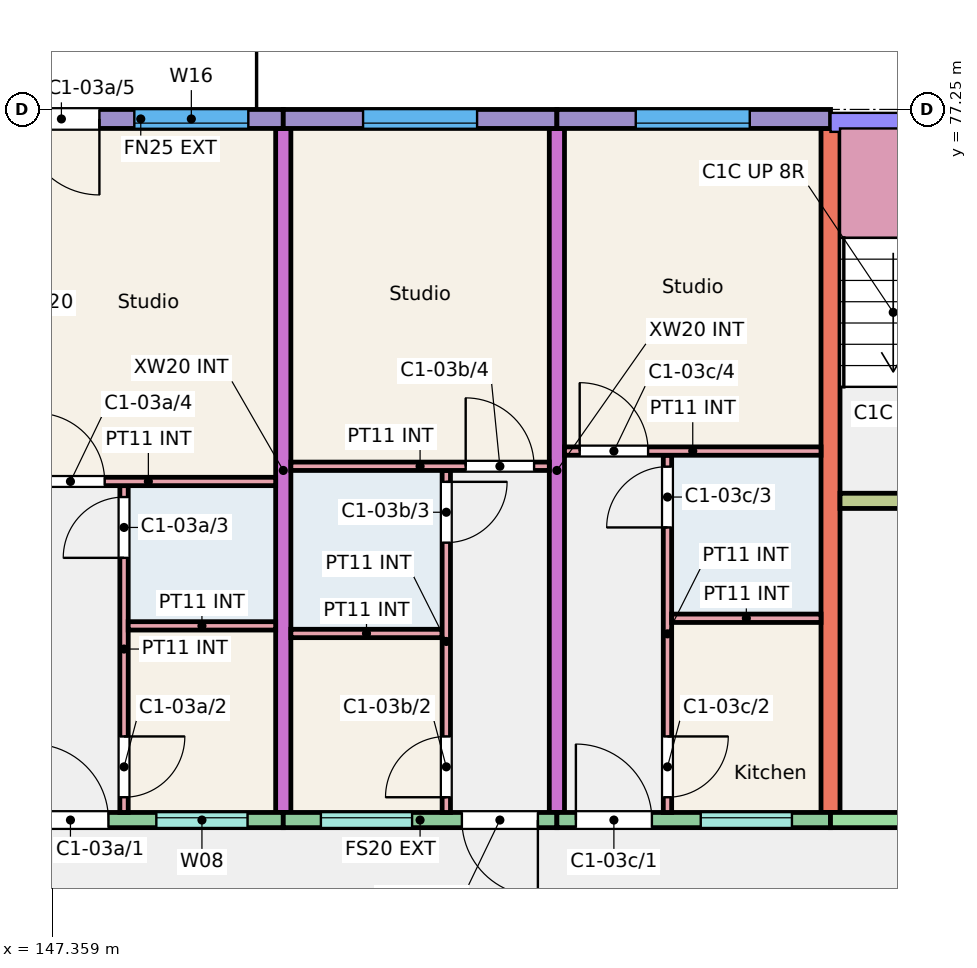
"""IFC4 building model, lengths in metres.
Left out: names, types, materials, properties, quantities, classifications, styles, units other than length and angle.
Written with IfcOpenShell. Run it as: python <this file> out.ifc"""

import sys

from ifc_helpers import new_model, si_unit, direction, frame, frame_2d, origin, place, context, subcontext, project, spatial, rectangle, extrude, element, fill, save


model = new_model("IFC4")
c1 = context("Model", 3, precision=1e-05, world=origin(), true_north=direction((0.0, 1.0)))
c2 = subcontext(c1, "Body", "Model", "MODEL_VIEW")
j1 = project(units=[si_unit("LENGTHUNIT", "METRE"), si_unit("PLANEANGLEUNIT", "RADIAN")], contexts=[c1])
p1 = place(None, origin())
s1 = spatial("IfcSite", under=j1, at=p1, CompositionType="ELEMENT")
p2 = place(p1, origin())
s2 = spatial("IfcBuilding", under=s1, at=p2, CompositionType="ELEMENT")
p3 = place(p2, frame((0.0, 0.0, 9.0)))
s3 = spatial("IfcBuildingStorey", under=s2, at=p3, CompositionType="ELEMENT", Elevation=9.0)
for number, where, z_axis, x_axis in (
    (1, (150.4, 68.0, 0.0), (0.0, 0.0, 1.0), (0.0, 1.0, 0.0)),
    (2, (154.0, 68.0, 0.0), (0.0, 0.0, 1.0), (0.0, 1.0, 0.0)),
):
    element("IfcWall", number, at=place(p3, frame(where, z_axis=z_axis, x_axis=x_axis)), inside=s3, PredefinedType="SHEAR", context=c2, shape_type="SweptSolid", body=[
        extrude(rectangle(XDim=9.0, YDim=0.2, at=frame_2d((4.5, 0.0))), origin(), (0.0, 0.0, 1.0), 3.0),
    ])
p4 = place(p3, frame((157.6, 68.0, 0.0), z_axis=(0.0, 0.0, 1.0), x_axis=(0.0, 1.0, 0.0)))
e3 = element("IfcWall", 3, at=p4, inside=s3, PredefinedType="SHEAR", context=c2, shape_type="SweptSolid", body=[
    extrude(rectangle(XDim=9.0, YDim=0.25, at=frame_2d((4.5, 0.0))), origin(), (0.0, 0.0, 1.0), 3.0),
])
p5 = place(p3, frame((146.65, 77.125, 0.0), z_axis=(0.0, 0.0, 1.0), x_axis=(1.0, 0.0, 0.0)))
e4 = element("IfcWall", 4, at=p5, inside=s3, PredefinedType="SOLIDWALL", context=c2, shape_type="SweptSolid", body=[
    extrude(rectangle(XDim=3.75, YDim=0.25, at=frame_2d((1.875, 0.0))), origin(), (0.0, 0.0, 1.0), 3.0),
])
p6 = place(p5, frame((1.791, 0.0, 0.9)))
e5 = element("IfcOpeningElement", 5, at=p6, cuts=e4, PredefinedType="OPENING", context=c2, shape_type="SweptSolid", body=[
    extrude(rectangle(XDim=1.5, YDim=1.5, at=frame_2d((0.75, 0.75))), frame((0.0, 0.135, 0.0), z_axis=(0.0, -1.0, 0.0), x_axis=(1.0, 0.0, 0.0)), (0.0, 0.0, 1.0), 0.27),
])
p7 = place(p5, frame((0.331, 0.0, 0.0)))
e6 = element("IfcOpeningElement", 6, at=p7, cuts=e4, PredefinedType="OPENING", context=c2, shape_type="SweptSolid", body=[
    extrude(rectangle(XDim=1.0, YDim=2.1, at=frame_2d((0.5, 1.05))), frame((0.0, 0.135, 0.0), z_axis=(0.0, -1.0, 0.0), x_axis=(1.0, 0.0, 0.0)), (0.0, 0.0, 1.0), 0.27),
])
p8 = place(p3, frame((146.95, 67.9, 0.0), z_axis=(0.0, 0.0, 1.0), x_axis=(1.0, 0.0, 0.0)))
e7 = element("IfcWall", 7, at=p8, inside=s3, PredefinedType="SOLIDWALL", context=c2, shape_type="SweptSolid", body=[
    extrude(rectangle(XDim=3.45, YDim=0.2, at=frame_2d((1.725, 0.0))), origin(), (0.0, 0.0, 1.0), 3.0),
])
p9 = place(p8, frame((1.78, 0.0, 1.1)))
e8 = element("IfcOpeningElement", 8, at=p9, cuts=e7, PredefinedType="OPENING", context=c2, shape_type="SweptSolid", body=[
    extrude(rectangle(XDim=1.2, YDim=1.3, at=frame_2d((0.6, 0.65))), frame((0.0, 0.11, 0.0), z_axis=(0.0, -1.0, 0.0), x_axis=(1.0, 0.0, 0.0)), (0.0, 0.0, 1.0), 0.22),
])
p10 = place(p8, frame((0.15, 0.0, 0.0)))
e9 = element("IfcOpeningElement", 9, at=p10, cuts=e7, PredefinedType="OPENING", context=c2, shape_type="SweptSolid", body=[
    extrude(rectangle(XDim=1.0, YDim=2.1, at=frame_2d((0.5, 1.05))), frame((0.0, 0.11, 0.0), z_axis=(0.0, -1.0, 0.0), x_axis=(1.0, 0.0, 0.0)), (0.0, 0.0, 1.0), 0.22),
])
p11 = place(p3, frame((150.4, 77.125, 0.0), z_axis=(0.0, 0.0, 1.0), x_axis=(1.0, 0.0, 0.0)))
e10 = element("IfcWall", 10, at=p11, inside=s3, PredefinedType="SOLIDWALL", context=c2, shape_type="SweptSolid", body=[
    extrude(rectangle(XDim=3.6, YDim=0.25, at=frame_2d((1.8, 0.0))), origin(), (0.0, 0.0, 1.0), 3.0),
])
p12 = place(p11, frame((1.05, 0.0, 0.9)))
e11 = element("IfcOpeningElement", 11, at=p12, cuts=e10, PredefinedType="OPENING", context=c2, shape_type="SweptSolid", body=[
    extrude(rectangle(XDim=1.5, YDim=1.5, at=frame_2d((0.75, 0.75))), frame((0.0, 0.135, 0.0), z_axis=(0.0, -1.0, 0.0), x_axis=(1.0, 0.0, 0.0)), (0.0, 0.0, 1.0), 0.27),
])
p13 = place(p3, frame((150.4, 67.9, 0.0), z_axis=(0.0, 0.0, 1.0), x_axis=(1.0, 0.0, 0.0)))
e12 = element("IfcWall", 12, at=p13, inside=s3, PredefinedType="SOLIDWALL", context=c2, shape_type="SweptSolid", body=[
    extrude(rectangle(XDim=3.6, YDim=0.2, at=frame_2d((1.8, 0.0))), origin(), (0.0, 0.0, 1.0), 3.0),
])
p14 = place(p13, frame((0.495, 0.0, 1.1)))
e13 = element("IfcOpeningElement", 13, at=p14, cuts=e12, PredefinedType="OPENING", context=c2, shape_type="SweptSolid", body=[
    extrude(rectangle(XDim=1.2, YDim=1.3, at=frame_2d((0.6, 0.65))), frame((0.0, 0.11, 0.0), z_axis=(0.0, -1.0, 0.0), x_axis=(1.0, 0.0, 0.0)), (0.0, 0.0, 1.0), 0.22),
])
p15 = place(p13, frame((2.35, 0.0, 0.0)))
e14 = element("IfcOpeningElement", 14, at=p15, cuts=e12, PredefinedType="OPENING", context=c2, shape_type="SweptSolid", body=[
    extrude(rectangle(XDim=1.0, YDim=2.1, at=frame_2d((0.5, 1.05))), frame((0.0, 0.11, 0.0), z_axis=(0.0, -1.0, 0.0), x_axis=(1.0, 0.0, 0.0)), (0.0, 0.0, 1.0), 0.22),
])
p16 = place(p3, frame((154.0, 77.125, 0.0), z_axis=(0.0, 0.0, 1.0), x_axis=(1.0, 0.0, 0.0)))
e15 = element("IfcWall", 15, at=p16, inside=s3, PredefinedType="SOLIDWALL", context=c2, shape_type="SweptSolid", body=[
    extrude(rectangle(XDim=3.6, YDim=0.25, at=frame_2d((1.8, 0.0))), origin(), (0.0, 0.0, 1.0), 3.0),
])
p17 = place(p16, frame((1.038, 0.0, 0.9)))
e16 = element("IfcOpeningElement", 16, at=p17, cuts=e15, PredefinedType="OPENING", context=c2, shape_type="SweptSolid", body=[
    extrude(rectangle(XDim=1.5, YDim=1.5, at=frame_2d((0.75, 0.75))), frame((0.0, 0.135, 0.0), z_axis=(0.0, -1.0, 0.0), x_axis=(1.0, 0.0, 0.0)), (0.0, 0.0, 1.0), 0.27),
])
p18 = place(p3, frame((154.0, 67.9, 0.0), z_axis=(0.0, 0.0, 1.0), x_axis=(1.0, 0.0, 0.0)))
e17 = element("IfcWall", 17, at=p18, inside=s3, PredefinedType="SOLIDWALL", context=c2, shape_type="SweptSolid", body=[
    extrude(rectangle(XDim=3.6, YDim=0.2, at=frame_2d((1.8, 0.0))), origin(), (0.0, 0.0, 1.0), 3.0),
])
p19 = place(p18, frame((1.893, 0.0, 1.1)))
e18 = element("IfcOpeningElement", 18, at=p19, cuts=e17, PredefinedType="OPENING", context=c2, shape_type="SweptSolid", body=[
    extrude(rectangle(XDim=1.2, YDim=1.3, at=frame_2d((0.6, 0.65))), frame((0.0, 0.11, 0.0), z_axis=(0.0, -1.0, 0.0), x_axis=(1.0, 0.0, 0.0)), (0.0, 0.0, 1.0), 0.22),
])
p20 = place(p18, frame((0.25, 0.0, 0.0)))
e19 = element("IfcOpeningElement", 19, at=p20, cuts=e17, PredefinedType="OPENING", context=c2, shape_type="SweptSolid", body=[
    extrude(rectangle(XDim=1.0, YDim=2.1, at=frame_2d((0.5, 1.05))), frame((0.0, 0.11, 0.0), z_axis=(0.0, -1.0, 0.0), x_axis=(1.0, 0.0, 0.0)), (0.0, 0.0, 1.0), 0.22),
])
p21 = place(p3, frame((157.6, 67.9, 0.0), z_axis=(0.0, 0.0, 1.0), x_axis=(1.0, 0.0, 0.0)))
e20 = element("IfcWall", 20, at=p21, inside=s3, PredefinedType="SHEAR", context=c2, shape_type="SweptSolid", body=[
    extrude(rectangle(XDim=5.85, YDim=0.2, at=frame_2d((2.925, 0.0))), origin(), (0.0, 0.0, 1.0), 3.0),
])
p22 = place(p21, frame((2.438, 0.0, 0.0)))
e21 = element("IfcOpeningElement", 21, at=p22, cuts=e20, PredefinedType="OPENING", context=c2, shape_type="SweptSolid", body=[
    extrude(rectangle(XDim=1.1, YDim=2.1, at=frame_2d((0.55, 1.05))), frame((0.0, 0.11, 0.0), z_axis=(0.0, -1.0, 0.0), x_axis=(1.0, 0.0, 0.0)), (0.0, 0.0, 1.0), 0.22),
])
p23 = place(p3, frame((157.725, 72.1, 0.0), z_axis=(0.0, 0.0, 1.0), x_axis=(1.0, 0.0, 0.0)))
e22 = element("IfcWall", 22, at=p23, inside=s3, PredefinedType="SHEAR", context=c2, shape_type="SweptSolid", body=[
    extrude(rectangle(XDim=5.725, YDim=0.2, at=frame_2d((2.862, 0.0))), origin(), (0.0, 0.0, 1.0), 3.0),
])
p24 = place(p23, frame((0.95, 0.0, 0.0)))
e23 = element("IfcOpeningElement", 23, at=p24, cuts=e22, PredefinedType="OPENING", context=c2, shape_type="SweptSolid", body=[
    extrude(rectangle(XDim=1.0, YDim=2.1, at=frame_2d((0.5, 1.05))), frame((0.0, 0.11, 0.0), z_axis=(0.0, -1.0, 0.0), x_axis=(1.0, 0.0, 0.0)), (0.0, 0.0, 1.0), 0.22),
])
p25 = place(p23, frame((3.863, 0.0, 0.0)))
e24 = element("IfcOpeningElement", 24, at=p25, cuts=e22, PredefinedType="OPENING", context=c2, shape_type="SweptSolid", body=[
    extrude(rectangle(XDim=1.1, YDim=2.1, at=frame_2d((0.55, 1.05))), frame((0.0, 0.11, 0.0), z_axis=(0.0, -1.0, 0.0), x_axis=(1.0, 0.0, 0.0)), (0.0, 0.0, 1.0), 0.22),
])
p26 = place(p3, frame((148.305, 68.0, 0.0), z_axis=(0.0, 0.0, 1.0), x_axis=(0.0, 1.0, 0.0)))
e25 = element("IfcWall", 25, at=p26, inside=s3, PredefinedType="PARTITIONING", context=c2, shape_type="SweptSolid", body=[
    extrude(rectangle(XDim=4.3, YDim=0.11, at=frame_2d((2.15, 0.0))), origin(), (0.0, 0.0, 1.0), 2.8),
])
p27 = place(p26, frame((0.2, 0.0, 0.0)))
e26 = element("IfcOpeningElement", 26, at=p27, cuts=e25, PredefinedType="OPENING", context=c2, shape_type="SweptSolid", body=[
    extrude(rectangle(XDim=0.8, YDim=2.1, at=frame_2d((0.4, 1.05))), frame((0.0, 0.065, 0.0), z_axis=(0.0, -1.0, 0.0), x_axis=(1.0, 0.0, 0.0)), (0.0, 0.0, 1.0), 0.13),
])
p28 = place(p26, frame((3.35, 0.0, 0.0)))
e27 = element("IfcOpeningElement", 27, at=p28, cuts=e25, PredefinedType="OPENING", context=c2, shape_type="SweptSolid", body=[
    extrude(rectangle(XDim=0.8, YDim=2.1, at=frame_2d((0.4, 1.05))), frame((0.0, 0.065, 0.0), z_axis=(0.0, -1.0, 0.0), x_axis=(1.0, 0.0, 0.0)), (0.0, 0.0, 1.0), 0.13),
])
p29 = place(p3, frame((148.36, 70.455, 0.0), z_axis=(0.0, 0.0, 1.0), x_axis=(1.0, 0.0, 0.0)))
e28 = element("IfcWall", 28, at=p29, inside=s3, PredefinedType="PARTITIONING", context=c2, shape_type="SweptSolid", body=[
    extrude(rectangle(XDim=1.94, YDim=0.11, at=frame_2d((0.97, 0.0))), origin(), (0.0, 0.0, 1.0), 2.8),
])
p30 = place(p3, frame((146.95, 72.355, 0.0), z_axis=(0.0, 0.0, 1.0), x_axis=(1.0, 0.0, 0.0)))
e29 = element("IfcWall", 29, at=p30, inside=s3, PredefinedType="PARTITIONING", context=c2, shape_type="SweptSolid", body=[
    extrude(rectangle(XDim=3.35, YDim=0.11, at=frame_2d((1.675, 0.0))), origin(), (0.0, 0.0, 1.0), 2.8),
])
p31 = place(p30, frame((0.2, 0.0, 0.0)))
e30 = element("IfcOpeningElement", 30, at=p31, cuts=e29, PredefinedType="OPENING", context=c2, shape_type="SweptSolid", body=[
    extrude(rectangle(XDim=0.9, YDim=2.1, at=frame_2d((0.45, 1.05))), frame((0.0, 0.065, 0.0), z_axis=(0.0, -1.0, 0.0), x_axis=(1.0, 0.0, 0.0)), (0.0, 0.0, 1.0), 0.13),
])
p32 = place(p3, frame((150.5, 70.355, 0.0), z_axis=(0.0, 0.0, 1.0), x_axis=(1.0, 0.0, 0.0)))
e31 = element("IfcWall", 31, at=p32, inside=s3, PredefinedType="PARTITIONING", context=c2, shape_type="SweptSolid", body=[
    extrude(rectangle(XDim=1.99, YDim=0.11, at=frame_2d((0.995, 0.0))), origin(), (0.0, 0.0, 1.0), 2.8),
])
p33 = place(p3, frame((152.545, 68.0, 0.0), z_axis=(0.0, 0.0, 1.0), x_axis=(0.0, 1.0, 0.0)))
e32 = element("IfcWall", 32, at=p33, inside=s3, PredefinedType="PARTITIONING", context=c2, shape_type="SweptSolid", body=[
    extrude(rectangle(XDim=4.5, YDim=0.11, at=frame_2d((2.25, 0.0))), origin(), (0.0, 0.0, 1.0), 2.8),
])
p34 = place(p33, frame((0.2, 0.0, 0.0)))
e33 = element("IfcOpeningElement", 33, at=p34, cuts=e32, PredefinedType="OPENING", context=c2, shape_type="SweptSolid", body=[
    extrude(rectangle(XDim=0.8, YDim=2.1, at=frame_2d((0.4, 1.05))), frame((0.0, 0.065, 0.0), z_axis=(0.0, -1.0, 0.0), x_axis=(1.0, 0.0, 0.0)), (0.0, 0.0, 1.0), 0.13),
])
p35 = place(p33, frame((3.55, 0.0, 0.0)))
e34 = element("IfcOpeningElement", 34, at=p35, cuts=e32, PredefinedType="OPENING", context=c2, shape_type="SweptSolid", body=[
    extrude(rectangle(XDim=0.8, YDim=2.1, at=frame_2d((0.4, 1.05))), frame((0.0, 0.065, 0.0), z_axis=(0.0, -1.0, 0.0), x_axis=(1.0, 0.0, 0.0)), (0.0, 0.0, 1.0), 0.13),
])
p36 = place(p3, frame((150.5, 72.555, 0.0), z_axis=(0.0, 0.0, 1.0), x_axis=(1.0, 0.0, 0.0)))
e35 = element("IfcWall", 35, at=p36, inside=s3, PredefinedType="PARTITIONING", context=c2, shape_type="SweptSolid", body=[
    extrude(rectangle(XDim=3.4, YDim=0.11, at=frame_2d((1.7, 0.0))), origin(), (0.0, 0.0, 1.0), 2.8),
])
p37 = place(p36, frame((2.3, 0.0, 0.0)))
e36 = element("IfcOpeningElement", 36, at=p37, cuts=e35, PredefinedType="OPENING", context=c2, shape_type="SweptSolid", body=[
    extrude(rectangle(XDim=0.9, YDim=2.1, at=frame_2d((0.45, 1.05))), frame((0.0, 0.065, 0.0), z_axis=(0.0, -1.0, 0.0), x_axis=(1.0, 0.0, 0.0)), (0.0, 0.0, 1.0), 0.13),
])
p38 = place(p3, frame((155.455, 68.0, 0.0), z_axis=(0.0, 0.0, 1.0), x_axis=(0.0, 1.0, 0.0)))
e37 = element("IfcWall", 37, at=p38, inside=s3, PredefinedType="PARTITIONING", context=c2, shape_type="SweptSolid", body=[
    extrude(rectangle(XDim=4.7, YDim=0.11, at=frame_2d((2.35, 0.0))), origin(), (0.0, 0.0, 1.0), 2.8),
])
p39 = place(p38, frame((0.2, 0.0, 0.0)))
e38 = element("IfcOpeningElement", 38, at=p39, cuts=e37, PredefinedType="OPENING", context=c2, shape_type="SweptSolid", body=[
    extrude(rectangle(XDim=0.8, YDim=2.1, at=frame_2d((0.4, 1.05))), frame((0.0, 0.065, 0.0), z_axis=(0.0, -1.0, 0.0), x_axis=(1.0, 0.0, 0.0)), (0.0, 0.0, 1.0), 0.13),
])
p40 = place(p38, frame((3.75, 0.0, 0.0)))
e39 = element("IfcOpeningElement", 39, at=p40, cuts=e37, PredefinedType="OPENING", context=c2, shape_type="SweptSolid", body=[
    extrude(rectangle(XDim=0.8, YDim=2.1, at=frame_2d((0.4, 1.05))), frame((0.0, 0.065, 0.0), z_axis=(0.0, -1.0, 0.0), x_axis=(1.0, 0.0, 0.0)), (0.0, 0.0, 1.0), 0.13),
])
p41 = place(p3, frame((155.51, 70.555, 0.0), z_axis=(0.0, 0.0, 1.0), x_axis=(1.0, 0.0, 0.0)))
e40 = element("IfcWall", 40, at=p41, inside=s3, PredefinedType="PARTITIONING", context=c2, shape_type="SweptSolid", body=[
    extrude(rectangle(XDim=1.965, YDim=0.11, at=frame_2d((0.982, 0.0))), origin(), (0.0, 0.0, 1.0), 2.8),
])
p42 = place(p3, frame((154.1, 72.755, 0.0), z_axis=(0.0, 0.0, 1.0), x_axis=(1.0, 0.0, 0.0)))
e41 = element("IfcWall", 41, at=p42, inside=s3, PredefinedType="PARTITIONING", context=c2, shape_type="SweptSolid", body=[
    extrude(rectangle(XDim=3.375, YDim=0.11, at=frame_2d((1.688, 0.0))), origin(), (0.0, 0.0, 1.0), 2.8),
])
p43 = place(p42, frame((0.2, 0.0, 0.0)))
e42 = element("IfcOpeningElement", 42, at=p43, cuts=e41, PredefinedType="OPENING", context=c2, shape_type="SweptSolid", body=[
    extrude(rectangle(XDim=0.9, YDim=2.1, at=frame_2d((0.45, 1.05))), frame((0.0, 0.065, 0.0), z_axis=(0.0, -1.0, 0.0), x_axis=(1.0, 0.0, 0.0)), (0.0, 0.0, 1.0), 0.13),
])
p44 = place(p9, origin())
e43 = element("IfcWindow", 43, at=p44, inside=s3, PartitioningType="SINGLE_PANEL", PredefinedType="WINDOW", context=c2, shape_type="SweptSolid", body=[
    extrude(rectangle(XDim=1.2, YDim=1.3, at=frame_2d((0.6, 0.65))), frame((0.0, 0.06, 0.0), z_axis=(0.0, -1.0, 0.0), x_axis=(1.0, 0.0, 0.0)), (0.0, 0.0, 1.0), 0.06),
])
fill(e8, e43)
p45 = place(p6, origin())
e44 = element("IfcWindow", 44, at=p45, inside=s3, PartitioningType="SINGLE_PANEL", PredefinedType="WINDOW", context=c2, shape_type="SweptSolid", body=[
    extrude(rectangle(XDim=1.5, YDim=1.5, at=frame_2d((0.75, 0.75))), frame((0.0, -0.025, 0.0), z_axis=(0.0, -1.0, 0.0), x_axis=(1.0, 0.0, 0.0)), (0.0, 0.0, 1.0), 0.06),
])
fill(e5, e44)
p46 = place(p14, origin())
e45 = element("IfcWindow", 45, at=p46, inside=s3, PartitioningType="SINGLE_PANEL", PredefinedType="WINDOW", context=c2, shape_type="SweptSolid", body=[
    extrude(rectangle(XDim=1.2, YDim=1.3, at=frame_2d((0.6, 0.65))), frame((0.0, 0.06, 0.0), z_axis=(0.0, -1.0, 0.0), x_axis=(1.0, 0.0, 0.0)), (0.0, 0.0, 1.0), 0.06),
])
fill(e13, e45)
p47 = place(p12, origin())
e46 = element("IfcWindow", 46, at=p47, inside=s3, PartitioningType="SINGLE_PANEL", PredefinedType="WINDOW", context=c2, shape_type="SweptSolid", body=[
    extrude(rectangle(XDim=1.5, YDim=1.5, at=frame_2d((0.75, 0.75))), frame((0.0, -0.025, 0.0), z_axis=(0.0, -1.0, 0.0), x_axis=(1.0, 0.0, 0.0)), (0.0, 0.0, 1.0), 0.06),
])
fill(e11, e46)
p48 = place(p19, origin())
e47 = element("IfcWindow", 47, at=p48, inside=s3, PartitioningType="SINGLE_PANEL", PredefinedType="WINDOW", context=c2, shape_type="SweptSolid", body=[
    extrude(rectangle(XDim=1.2, YDim=1.3, at=frame_2d((0.6, 0.65))), frame((0.0, 0.06, 0.0), z_axis=(0.0, -1.0, 0.0), x_axis=(1.0, 0.0, 0.0)), (0.0, 0.0, 1.0), 0.06),
])
fill(e18, e47)
p49 = place(p17, origin())
e48 = element("IfcWindow", 48, at=p49, inside=s3, PartitioningType="SINGLE_PANEL", PredefinedType="WINDOW", context=c2, shape_type="SweptSolid", body=[
    extrude(rectangle(XDim=1.5, YDim=1.5, at=frame_2d((0.75, 0.75))), frame((0.0, -0.025, 0.0), z_axis=(0.0, -1.0, 0.0), x_axis=(1.0, 0.0, 0.0)), (0.0, 0.0, 1.0), 0.06),
])
fill(e16, e48)
p50 = place(p10, origin())
e49 = element("IfcDoor", 49, at=p50, inside=s3, OperationType="SINGLE_SWING_LEFT", PredefinedType="DOOR", context=c2, shape_type="SweptSolid", body=[
    extrude(rectangle(XDim=1.0, YDim=2.1, at=frame_2d((0.5, 1.05))), frame((0.0, 0.025, 0.0), z_axis=(0.0, -1.0, 0.0), x_axis=(1.0, 0.0, 0.0)), (0.0, 0.0, 1.0), 0.05),
])
fill(e9, e49)
p51 = place(p27, origin())
e50 = element("IfcDoor", 50, at=p51, inside=s3, OperationType="SINGLE_SWING_RIGHT", PredefinedType="DOOR", context=c2, shape_type="SweptSolid", body=[
    extrude(rectangle(XDim=0.8, YDim=2.1, at=frame_2d((0.4, 1.05))), frame((0.0, 0.025, 0.0), z_axis=(0.0, -1.0, 0.0), x_axis=(1.0, 0.0, 0.0)), (0.0, 0.0, 1.0), 0.05),
])
fill(e26, e50)
p52 = place(p28, origin())
e51 = element("IfcDoor", 51, at=p52, inside=s3, OperationType="SINGLE_SWING_LEFT", PredefinedType="DOOR", context=c2, shape_type="SweptSolid", body=[
    extrude(rectangle(XDim=0.8, YDim=2.1, at=frame_2d((0.4, 1.05))), frame((0.0, 0.025, 0.0), z_axis=(0.0, -1.0, 0.0), x_axis=(1.0, 0.0, 0.0)), (0.0, 0.0, 1.0), 0.05),
])
fill(e27, e51)
p53 = place(p31, origin())
e52 = element("IfcDoor", 52, at=p53, inside=s3, OperationType="SINGLE_SWING_LEFT", PredefinedType="DOOR", context=c2, shape_type="SweptSolid", body=[
    extrude(rectangle(XDim=0.9, YDim=2.1, at=frame_2d((0.45, 1.05))), frame((0.0, 0.025, 0.0), z_axis=(0.0, -1.0, 0.0), x_axis=(1.0, 0.0, 0.0)), (0.0, 0.0, 1.0), 0.05),
])
fill(e30, e52)
p54 = place(p7, origin())
e53 = element("IfcDoor", 53, at=p54, inside=s3, OperationType="SINGLE_SWING_RIGHT", PredefinedType="DOOR", context=c2, shape_type="SweptSolid", body=[
    extrude(rectangle(XDim=1.0, YDim=2.1, at=frame_2d((0.5, 1.05))), frame((0.0, 0.025, 0.0), z_axis=(0.0, -1.0, 0.0), x_axis=(1.0, 0.0, 0.0)), (0.0, 0.0, 1.0), 0.05),
])
fill(e6, e53)
p55 = place(p15, origin())
e54 = element("IfcDoor", 54, at=p55, inside=s3, OperationType="SINGLE_SWING_RIGHT", PredefinedType="DOOR", context=c2, shape_type="SweptSolid", body=[
    extrude(rectangle(XDim=1.0, YDim=2.1, at=frame_2d((0.5, 1.05))), frame((0.0, 0.025, 0.0), z_axis=(0.0, -1.0, 0.0), x_axis=(1.0, 0.0, 0.0)), (0.0, 0.0, 1.0), 0.05),
])
fill(e14, e54)
p56 = place(p34, origin())
e55 = element("IfcDoor", 55, at=p56, inside=s3, OperationType="SINGLE_SWING_LEFT", PredefinedType="DOOR", context=c2, shape_type="SweptSolid", body=[
    extrude(rectangle(XDim=0.8, YDim=2.1, at=frame_2d((0.4, 1.05))), frame((0.0, 0.025, 0.0), z_axis=(0.0, -1.0, 0.0), x_axis=(1.0, 0.0, 0.0)), (0.0, 0.0, 1.0), 0.05),
])
fill(e33, e55)
p57 = place(p35, origin())
e56 = element("IfcDoor", 56, at=p57, inside=s3, OperationType="SINGLE_SWING_RIGHT", PredefinedType="DOOR", context=c2, shape_type="SweptSolid", body=[
    extrude(rectangle(XDim=0.8, YDim=2.1, at=frame_2d((0.4, 1.05))), frame((0.0, 0.025, 0.0), z_axis=(0.0, -1.0, 0.0), x_axis=(1.0, 0.0, 0.0)), (0.0, 0.0, 1.0), 0.05),
])
fill(e34, e56)
p58 = place(p37, origin())
e57 = element("IfcDoor", 57, at=p58, inside=s3, OperationType="SINGLE_SWING_LEFT", PredefinedType="DOOR", context=c2, shape_type="SweptSolid", body=[
    extrude(rectangle(XDim=0.9, YDim=2.1, at=frame_2d((0.45, 1.05))), frame((0.0, 0.025, 0.0), z_axis=(0.0, -1.0, 0.0), x_axis=(1.0, 0.0, 0.0)), (0.0, 0.0, 1.0), 0.05),
])
fill(e36, e57)
p59 = place(p20, origin())
e58 = element("IfcDoor", 58, at=p59, inside=s3, OperationType="SINGLE_SWING_LEFT", PredefinedType="DOOR", context=c2, shape_type="SweptSolid", body=[
    extrude(rectangle(XDim=1.0, YDim=2.1, at=frame_2d((0.5, 1.05))), frame((0.0, 0.025, 0.0), z_axis=(0.0, -1.0, 0.0), x_axis=(1.0, 0.0, 0.0)), (0.0, 0.0, 1.0), 0.05),
])
fill(e19, e58)
p60 = place(p39, origin())
e59 = element("IfcDoor", 59, at=p60, inside=s3, OperationType="SINGLE_SWING_RIGHT", PredefinedType="DOOR", context=c2, shape_type="SweptSolid", body=[
    extrude(rectangle(XDim=0.8, YDim=2.1, at=frame_2d((0.4, 1.05))), frame((0.0, 0.025, 0.0), z_axis=(0.0, -1.0, 0.0), x_axis=(1.0, 0.0, 0.0)), (0.0, 0.0, 1.0), 0.05),
])
fill(e38, e59)
p61 = place(p40, origin())
e60 = element("IfcDoor", 60, at=p61, inside=s3, OperationType="SINGLE_SWING_LEFT", PredefinedType="DOOR", context=c2, shape_type="SweptSolid", body=[
    extrude(rectangle(XDim=0.8, YDim=2.1, at=frame_2d((0.4, 1.05))), frame((0.0, 0.025, 0.0), z_axis=(0.0, -1.0, 0.0), x_axis=(1.0, 0.0, 0.0)), (0.0, 0.0, 1.0), 0.05),
])
fill(e39, e60)
p62 = place(p43, origin())
e61 = element("IfcDoor", 61, at=p62, inside=s3, OperationType="SINGLE_SWING_LEFT", PredefinedType="DOOR", context=c2, shape_type="SweptSolid", body=[
    extrude(rectangle(XDim=0.9, YDim=2.1, at=frame_2d((0.45, 1.05))), frame((0.0, 0.025, 0.0), z_axis=(0.0, -1.0, 0.0), x_axis=(1.0, 0.0, 0.0)), (0.0, 0.0, 1.0), 0.05),
])
fill(e42, e61)
save(model, sys.argv[1])
